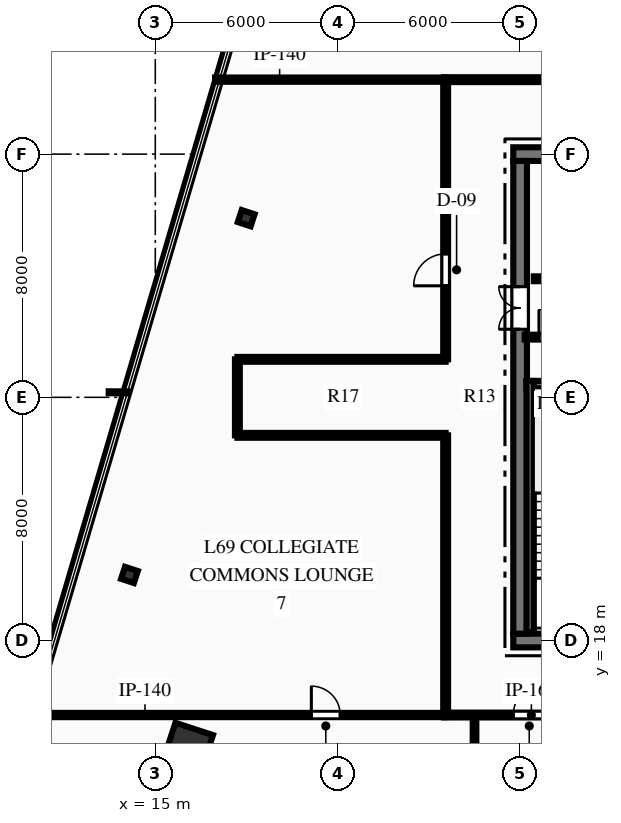
"""IFC4 building model, lengths in metres.
Left out: names, types, materials, properties, quantities, classifications, styles, units other than length and angle.
Written with IfcOpenShell. Run it as: python <this file> out.ifc"""

import sys

from ifc_helpers import new_model, si_unit, direction, frame, frame_2d, origin, origin_2d, place, context, subcontext, project, spatial, rectangle, hollow_rectangle, i_section, extrude, element, fill, save


model = new_model("IFC4")
c1 = context("Model", 3, precision=1e-05, world=origin(), true_north=direction((0.0, 1.0)))
c2 = subcontext(c1, "Body", "Model", "MODEL_VIEW")
j1 = project(units=[si_unit("LENGTHUNIT", "METRE"), si_unit("PLANEANGLEUNIT", "RADIAN")], contexts=[c1])
p1 = place(None, origin())
s1 = spatial("IfcSite", under=j1, at=p1, CompositionType="ELEMENT")
p2 = place(p1, origin())
s2 = spatial("IfcBuilding", under=s1, at=p2, CompositionType="ELEMENT")
p3 = place(p2, frame((0.0, 0.0, 274.95)))
s3 = spatial("IfcBuildingStorey", under=s2, at=p3, CompositionType="ELEMENT", Elevation=274.95)
p4 = place(p3, frame((26.775, 18.0, 0.0), z_axis=(0.0, 0.0, 1.0), x_axis=(1.0, 0.0, 0.0)))
e1 = element("IfcWall", 1, at=p4, inside=s3, PredefinedType="SHEAR", context=c2, shape_type="SweptSolid", body=[
    extrude(rectangle(XDim=18.45, YDim=0.45, at=frame_2d((9.225, 0.0))), origin(), (0.0, 0.0, 1.0), 3.75),
])
p5 = place(p4, frame((7.325, 0.0, 0.0)))
e2 = element("IfcOpeningElement", 2, at=p5, cuts=e1, PredefinedType="OPENING", context=c2, shape_type="SweptSolid", body=[
    extrude(rectangle(XDim=1.1, YDim=2.15, at=frame_2d((0.55, 1.075))), frame((0.0, 0.235, 0.0), z_axis=(0.0, -1.0, 0.0), x_axis=(1.0, 0.0, 0.0)), (0.0, 0.0, 1.0), 0.47),
])
p6 = place(p4, frame((10.025, 0.0, 0.0)))
e3 = element("IfcOpeningElement", 3, at=p6, cuts=e1, PredefinedType="OPENING", context=c2, shape_type="SweptSolid", body=[
    extrude(rectangle(XDim=1.1, YDim=2.15, at=frame_2d((0.55, 1.075))), frame((0.0, 0.235, 0.0), z_axis=(0.0, -1.0, 0.0), x_axis=(1.0, 0.0, 0.0)), (0.0, 0.0, 1.0), 0.47),
])
p7 = place(p3, frame((26.775, 34.0, 0.0), z_axis=(0.0, 0.0, 1.0), x_axis=(1.0, 0.0, 0.0)))
e4 = element("IfcWall", 4, at=p7, inside=s3, PredefinedType="SHEAR", context=c2, shape_type="SweptSolid", body=[
    extrude(rectangle(XDim=18.45, YDim=0.45, at=frame_2d((9.225, 0.0))), origin(), (0.0, 0.0, 1.0), 3.75),
])
p8 = place(p3, frame((27.0, 18.225, 0.0), z_axis=(0.0, 0.0, 1.0), x_axis=(0.0, 1.0, 0.0)))
e5 = element("IfcWall", 5, at=p8, inside=s3, PredefinedType="SHEAR", context=c2, shape_type="SweptSolid", body=[
    extrude(rectangle(XDim=15.55, YDim=0.45, at=frame_2d((7.775, 0.0))), origin(), (0.0, 0.0, 1.0), 3.75),
])
p9 = place(p8, frame((10.015, 0.0, 0.0)))
e6 = element("IfcOpeningElement", 6, at=p9, cuts=e5, PredefinedType="OPENING", context=c2, shape_type="SweptSolid", body=[
    extrude(rectangle(XDim=1.4, YDim=2.2, at=frame_2d((0.7, 1.1))), frame((0.0, 0.235, 0.0), z_axis=(0.0, -1.0, 0.0), x_axis=(1.0, 0.0, 0.0)), (0.0, 0.0, 1.0), 0.47),
])
p10 = place(p3, frame((27.21, 26.42, 0.0), z_axis=(0.0, 0.0, 1.0), x_axis=(1.0, 0.0, 0.0)))
e7 = element("IfcWall", 7, at=p10, inside=s3, PredefinedType="SHEAR", context=c2, shape_type="SweptSolid", body=[
    extrude(rectangle(XDim=3.98, YDim=0.24, at=frame_2d((1.99, 0.0))), origin(), (0.0, 0.0, 1.0), 3.75),
])
p11 = place(p3, frame((27.33, 18.28, 0.0), z_axis=(0.0, 0.0, 1.0), x_axis=(0.0, 1.0, 0.0)))
e8 = element("IfcWall", 8, at=p11, inside=s3, PredefinedType="SHEAR", context=c2, shape_type="SweptSolid", body=[
    extrude(rectangle(XDim=8.26, YDim=0.24, at=frame_2d((4.13, 0.0))), origin(), (0.0, 0.0, 1.0), 3.75),
])
p12 = place(p3, frame((16.077, 14.475, 0.0), z_axis=(0.0, 0.0, 1.0), x_axis=(0.311008203279, 0.950407227189, 0.0)))
e9 = element("IfcColumn", 9, at=p12, inside=s3, PredefinedType="COLUMN", context=c2, shape_type="SweptSolid", body=[
    extrude(hollow_rectangle(XDim=1.3, YDim=1.3, WallThickness=0.06, at=origin_2d()), origin(), (0.0, 0.0, 1.0), 3.75),
])
for number, where, z_axis, x_axis in (
    (10, (17.99, 31.894, 0.0), (0.0, 0.0, 1.0), (0.311, 0.95, 0.0)),
    (11, (14.149, 20.158, 0.0), (0.0, 0.0, 1.0), (0.311, 0.95, 0.0)),
):
    element("IfcColumn", number, at=place(p3, frame(where, z_axis=z_axis, x_axis=x_axis)), inside=s3, PredefinedType="COLUMN", context=c2, shape_type="SweptSolid", body=[
        extrude(i_section(OverallWidth=0.416, OverallDepth=0.445, WebThickness=0.039, FlangeThickness=0.063, at=origin_2d()), origin(), (0.0, 0.0, 1.0), 3.75),
    ])
p13 = place(p3, frame((27.15, 27.98, 0.0), z_axis=(0.0, 0.0, 1.0), x_axis=(1.0, 0.0, 0.0)))
e12 = element("IfcWall", 12, at=p13, inside=s3, PredefinedType="PARTITIONING", context=c2, shape_type="SweptSolid", body=[
    extrude(rectangle(XDim=4.05, YDim=0.16, at=frame_2d((2.025, 0.0))), origin(), (0.0, 0.0, 1.0), 3.48),
])
p14 = place(p13, frame((0.47, 0.0, 0.0)))
e13 = element("IfcOpeningElement", 13, at=p14, cuts=e12, PredefinedType="OPENING", context=c2, shape_type="SweptSolid", body=[
    extrude(rectangle(XDim=0.9, YDim=2.15, at=frame_2d((0.45, 1.075))), frame((0.0, 0.09, 0.0), z_axis=(0.0, -1.0, 0.0), x_axis=(1.0, 0.0, 0.0)), (0.0, 0.0, 1.0), 0.18),
])
p15 = place(p13, frame((2.36, 0.0, 0.0)))
e14 = element("IfcOpeningElement", 14, at=p15, cuts=e12, PredefinedType="OPENING", context=c2, shape_type="SweptSolid", body=[
    extrude(rectangle(XDim=0.9, YDim=2.15, at=frame_2d((0.45, 1.075))), frame((0.0, 0.09, 0.0), z_axis=(0.0, -1.0, 0.0), x_axis=(1.0, 0.0, 0.0)), (0.0, 0.0, 1.0), 0.18),
])
p16 = place(p3, frame((27.45, 29.9, 0.0), z_axis=(0.0, 0.0, 1.0), x_axis=(1.0, 0.0, 0.0)))
e15 = element("IfcWall", 15, at=p16, inside=s3, PredefinedType="PARTITIONING", context=c2, shape_type="SweptSolid", body=[
    extrude(rectangle(XDim=4.43, YDim=0.16, at=frame_2d((2.215, 0.0))), origin(), (0.0, 0.0, 1.0), 3.48),
])
p17 = place(p16, frame((0.6, 0.0, 0.0)))
e16 = element("IfcOpeningElement", 16, at=p17, cuts=e15, PredefinedType="OPENING", context=c2, shape_type="SweptSolid", body=[
    extrude(rectangle(XDim=0.9, YDim=2.15, at=frame_2d((0.45, 1.075))), frame((0.0, 0.09, 0.0), z_axis=(0.0, -1.0, 0.0), x_axis=(1.0, 0.0, 0.0)), (0.0, 0.0, 1.0), 0.18),
])
p18 = place(p16, frame((2.85, 0.0, 0.0)))
e17 = element("IfcOpeningElement", 17, at=p18, cuts=e15, PredefinedType="OPENING", context=c2, shape_type="SweptSolid", body=[
    extrude(rectangle(XDim=0.9, YDim=2.15, at=frame_2d((0.45, 1.075))), frame((0.0, 0.09, 0.0), z_axis=(0.0, -1.0, 0.0), x_axis=(1.0, 0.0, 0.0)), (0.0, 0.0, 1.0), 0.18),
])
p19 = place(p3, frame((24.5, 15.55, 0.0), z_axis=(0.0, 0.0, 1.0), x_axis=(1.0, 0.0, 0.0)))
e18 = element("IfcWall", 18, at=p19, inside=s3, PredefinedType="PARTITIONING", context=c2, shape_type="SweptSolid", body=[
    extrude(rectangle(XDim=10.25, YDim=0.16, at=frame_2d((5.125, 0.0))), origin(), (0.0, 0.0, 1.0), 3.48),
])
p20 = place(p19, frame((2.275, 0.0, 0.0)))
e19 = element("IfcOpeningElement", 19, at=p20, cuts=e18, PredefinedType="OPENING", context=c2, shape_type="SweptSolid", body=[
    extrude(rectangle(XDim=1.05, YDim=2.15, at=frame_2d((0.525, 1.075))), frame((0.0, 0.09, 0.0), z_axis=(0.0, -1.0, 0.0), x_axis=(1.0, 0.0, 0.0)), (0.0, 0.0, 1.0), 0.18),
])
p21 = place(p3, frame((24.5, 36.45, 0.0), z_axis=(0.0, 0.0, 1.0), x_axis=(1.0, 0.0, 0.0)))
e20 = element("IfcWall", 20, at=p21, inside=s3, PredefinedType="PARTITIONING", context=c2, shape_type="SweptSolid", body=[
    extrude(rectangle(XDim=10.25, YDim=0.16, at=frame_2d((5.125, 0.0))), origin(), (0.0, 0.0, 1.0), 3.48),
])
p22 = place(p21, frame((6.445, 0.0, 0.0)))
e21 = element("IfcOpeningElement", 21, at=p22, cuts=e20, PredefinedType="OPENING", context=c2, shape_type="SweptSolid", body=[
    extrude(rectangle(XDim=1.05, YDim=2.15, at=frame_2d((0.525, 1.075))), frame((0.0, 0.09, 0.0), z_axis=(0.0, -1.0, 0.0), x_axis=(1.0, 0.0, 0.0)), (0.0, 0.0, 1.0), 0.18),
])
p23 = place(p3, frame((24.55, 15.55, 0.0), z_axis=(0.0, 0.0, 1.0), x_axis=(0.0, 1.0, 0.0)))
e22 = element("IfcWall", 22, at=p23, inside=s3, PredefinedType="PARTITIONING", context=c2, shape_type="SweptSolid", body=[
    extrude(rectangle(XDim=9.2, YDim=0.16, at=frame_2d((4.6, 0.0))), origin(), (0.0, 0.0, 1.0), 3.48),
])
p24 = place(p3, frame((24.55, 27.25, 0.0), z_axis=(0.0, 0.0, 1.0), x_axis=(0.0, 1.0, 0.0)))
e23 = element("IfcWall", 23, at=p24, inside=s3, PredefinedType="PARTITIONING", context=c2, shape_type="SweptSolid", body=[
    extrude(rectangle(XDim=9.2, YDim=0.16, at=frame_2d((4.6, 0.0))), origin(), (0.0, 0.0, 1.0), 3.48),
])
p25 = place(p24, frame((2.419, 0.0, 0.0)))
e24 = element("IfcOpeningElement", 24, at=p25, cuts=e23, PredefinedType="OPENING", context=c2, shape_type="SweptSolid", body=[
    extrude(rectangle(XDim=1.05, YDim=2.15, at=frame_2d((0.525, 1.075))), frame((0.0, 0.09, 0.0), z_axis=(0.0, -1.0, 0.0), x_axis=(1.0, 0.0, 0.0)), (0.0, 0.0, 1.0), 0.18),
])
for number, where, z_axis, x_axis in (
    (25, (17.7, 24.75, 0.0), (0.0, 0.0, 1.0), (1.0, 0.0, 0.0)),
    (26, (17.7, 27.25, 0.0), (0.0, 0.0, 1.0), (1.0, 0.0, 0.0)),
):
    element("IfcWall", number, at=place(p3, frame(where, z_axis=z_axis, x_axis=x_axis)), inside=s3, PredefinedType="PARTITIONING", context=c2, shape_type="SweptSolid", body=[
        extrude(rectangle(XDim=6.85, YDim=0.16, at=frame_2d((3.425, 0.0))), origin(), (0.0, 0.0, 1.0), 3.48),
    ])
p26 = place(p3, frame((17.7, 24.75, 0.0), z_axis=(0.0, 0.0, 1.0), x_axis=(0.0, 1.0, 0.0)))
e27 = element("IfcWall", 27, at=p26, inside=s3, PredefinedType="PARTITIONING", context=c2, shape_type="SweptSolid", body=[
    extrude(rectangle(XDim=2.5, YDim=0.16, at=frame_2d((1.25, 0.0))), origin(), (0.0, 0.0, 1.0), 3.48),
])
p27 = place(p3, frame((10.815, 15.55, 0.0), z_axis=(0.0, 0.0, 1.0), x_axis=(1.0, 0.0, 0.0)))
e28 = element("IfcWall", 28, at=p27, inside=s3, PredefinedType="PARTITIONING", context=c2, shape_type="SweptSolid", body=[
    extrude(rectangle(XDim=13.735, YDim=0.14, at=frame_2d((6.868, 0.0))), origin(), (0.0, 0.0, 1.0), 2.858),
])
p28 = place(p27, frame((9.318, 0.0, 0.0)))
e29 = element("IfcOpeningElement", 29, at=p28, cuts=e28, PredefinedType="OPENING", context=c2, shape_type="SweptSolid", body=[
    extrude(rectangle(XDim=0.95, YDim=2.15, at=frame_2d((0.475, 1.075))), frame((0.0, 0.08, 0.0), z_axis=(0.0, -1.0, 0.0), x_axis=(1.0, 0.0, 0.0)), (0.0, 0.0, 1.0), 0.16),
])
p29 = place(p3, frame((16.966, 36.45, 0.0), z_axis=(0.0, 0.0, 1.0), x_axis=(1.0, 0.0, 0.0)))
e30 = element("IfcWall", 30, at=p29, inside=s3, PredefinedType="PARTITIONING", context=c2, shape_type="SweptSolid", body=[
    extrude(rectangle(XDim=7.584, YDim=0.14, at=frame_2d((3.792, 0.0))), origin(), (0.0, 0.0, 1.0), 3.48),
])
p30 = place(p3, frame((25.5, 5.104, 0.0), z_axis=(0.0, 0.0, 1.0), x_axis=(0.0, 1.0, 0.0)))
e31 = element("IfcWall", 31, at=p30, inside=s3, PredefinedType="PARTITIONING", context=c2, shape_type="SweptSolid", body=[
    extrude(rectangle(XDim=10.446, YDim=0.12, at=frame_2d((5.223, 0.0))), origin(), (0.0, 0.0, 1.0), 3.48),
])
p31 = place(p14, origin())
e32 = element("IfcDoor", 32, at=p31, inside=s3, OperationType="SINGLE_SWING_LEFT", PredefinedType="DOOR", context=c2, shape_type="SweptSolid", body=[
    extrude(rectangle(XDim=0.9, YDim=2.15, at=frame_2d((0.45, 1.075))), frame((0.0, 0.025, 0.0), z_axis=(0.0, -1.0, 0.0), x_axis=(1.0, 0.0, 0.0)), (0.0, 0.0, 1.0), 0.05),
])
fill(e13, e32)
p32 = place(p9, origin())
e33 = element("IfcDoor", 33, at=p32, inside=s3, OperationType="DOUBLE_DOOR_SINGLE_SWING", PredefinedType="DOOR", context=c2, shape_type="SweptSolid", body=[
    extrude(rectangle(XDim=1.4, YDim=2.2, at=frame_2d((0.7, 1.1))), frame((0.0, 0.025, 0.0), z_axis=(0.0, -1.0, 0.0), x_axis=(1.0, 0.0, 0.0)), (0.0, 0.0, 1.0), 0.05),
])
fill(e6, e33)
p33 = place(p28, origin())
e34 = element("IfcDoor", 34, at=p33, inside=s3, OperationType="SINGLE_SWING_LEFT", PredefinedType="DOOR", context=c2, shape_type="SweptSolid", body=[
    extrude(rectangle(XDim=0.95, YDim=2.15, at=frame_2d((0.475, 1.075))), frame((0.0, 0.025, 0.0), z_axis=(0.0, -1.0, 0.0), x_axis=(1.0, 0.0, 0.0)), (0.0, 0.0, 1.0), 0.05),
])
fill(e29, e34)
p34 = place(p20, origin())
e35 = element("IfcDoor", 35, at=p34, inside=s3, OperationType="SINGLE_SWING_RIGHT", PredefinedType="DOOR", context=c2, shape_type="SweptSolid", body=[
    extrude(rectangle(XDim=1.05, YDim=2.15, at=frame_2d((0.525, 1.075))), frame((0.0, 0.025, 0.0), z_axis=(0.0, -1.0, 0.0), x_axis=(1.0, 0.0, 0.0)), (0.0, 0.0, 1.0), 0.05),
])
fill(e19, e35)
p35 = place(p25, origin())
e36 = element("IfcDoor", 36, at=p35, inside=s3, OperationType="SINGLE_SWING_LEFT", PredefinedType="DOOR", context=c2, shape_type="SweptSolid", body=[
    extrude(rectangle(XDim=1.05, YDim=2.15, at=frame_2d((0.525, 1.075))), frame((0.0, 0.025, 0.0), z_axis=(0.0, -1.0, 0.0), x_axis=(1.0, 0.0, 0.0)), (0.0, 0.0, 1.0), 0.05),
])
fill(e24, e36)
save(model, sys.argv[1])
